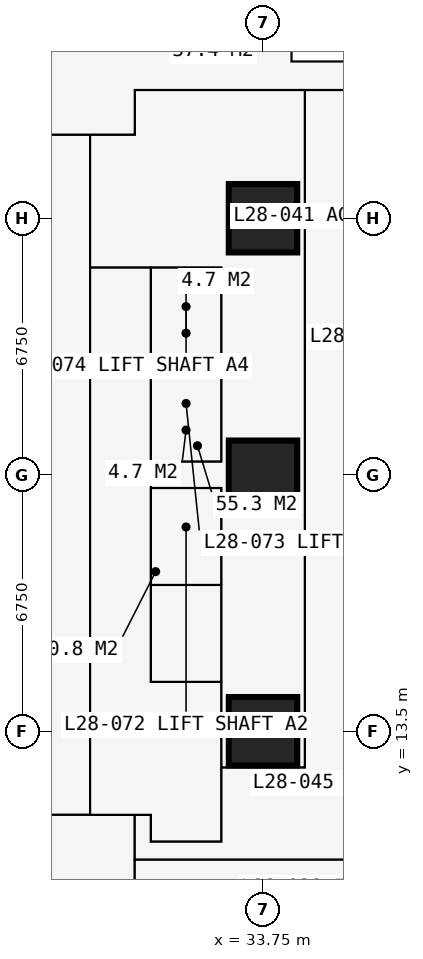
"""IFC4 building model, lengths in metres.
Left out: names, types, materials, properties, quantities, classifications, styles, units other than length and angle.
Written with IfcOpenShell. Run it as: python <this file> out.ifc"""

import sys

from ifc_helpers import new_model, si_unit, direction, frame, frame_2d, origin, origin_2d, place, context, subcontext, project, spatial, rectangle, extrude, element, fill, save


model = new_model("IFC4")
c1 = context("Model", 3, precision=1e-05, world=origin(), true_north=direction((0.0, 1.0)))
c2 = subcontext(c1, "Body", "Model", "MODEL_VIEW")
j1 = project(units=[si_unit("LENGTHUNIT", "METRE"), si_unit("PLANEANGLEUNIT", "RADIAN")], contexts=[c1])
p1 = place(None, origin())
s1 = spatial("IfcSite", under=j1, at=p1, CompositionType="ELEMENT")
p2 = place(p1, origin())
s2 = spatial("IfcBuilding", under=s1, at=p2, CompositionType="ELEMENT")
p3 = place(p2, frame((0.0, 0.0, 105.3)))
s3 = spatial("IfcBuildingStorey", under=s2, at=p3, CompositionType="ELEMENT", Elevation=105.3)
for number, where, z_axis, x_axis in (
    (1, (33.75, 13.5, 0.0), (0.0, 0.0, 1.0), (1.0, 0.0, 0.0)),
    (2, (33.75, 20.25, 0.0), (0.0, 0.0, 1.0), (1.0, 0.0, 0.0)),
    (3, (33.75, 27.0, 0.0), (0.0, 0.0, 1.0), (1.0, 0.0, 0.0)),
):
    element("IfcColumn", number, at=place(p3, frame(where, z_axis=z_axis, x_axis=x_axis)), inside=s3, PredefinedType="COLUMN", context=c2, shape_type="SweptSolid", body=[
        extrude(rectangle(XDim=1.8, YDim=1.8, at=origin_2d()), origin(), (0.0, 0.0, 1.0), 3.6),
    ])
p4 = place(p3, frame((37.875, 31.125, 0.0), z_axis=(0.0, 0.0, 1.0), x_axis=(-1.0, 0.0, 0.0)))
e4 = element("IfcWall", 4, at=p4, inside=s3, PredefinedType="SOLIDWALL", context=c2, shape_type="SweptSolid", body=[
    extrude(rectangle(XDim=3.375, YDim=0.3, at=frame_2d((1.688, 0.0))), origin(), (0.0, 0.0, 1.0), 3.375),
])
p5 = place(p4, frame((0.788, 0.0, 0.6)))
e5 = element("IfcOpeningElement", 5, at=p5, cuts=e4, PredefinedType="OPENING", context=c2, shape_type="SweptSolid", body=[
    extrude(rectangle(XDim=1.8, YDim=2.1, at=frame_2d((0.9, 1.05))), frame((0.0, 0.16, 0.0), z_axis=(0.0, -1.0, 0.0), x_axis=(1.0, 0.0, 0.0)), (0.0, 0.0, 1.0), 0.32),
])
p6 = place(p3, frame((34.5, 31.125, 0.0), z_axis=(0.0, 0.0, 1.0), x_axis=(0.0, 1.0, 0.0)))
e6 = element("IfcWall", 6, at=p6, inside=s3, PredefinedType="SOLIDWALL", context=c2, shape_type="SweptSolid", body=[
    extrude(rectangle(XDim=3.375, YDim=0.3, at=frame_2d((1.688, 0.0))), origin(), (0.0, 0.0, 1.0), 3.375),
])
p7 = place(p6, frame((0.343, 0.0, 0.9)))
e7 = element("IfcOpeningElement", 7, at=p7, cuts=e6, PredefinedType="OPENING", context=c2, shape_type="SweptSolid", body=[
    extrude(rectangle(XDim=1.2, YDim=1.8, at=frame_2d((0.6, 0.9))), frame((0.0, 0.16, 0.0), z_axis=(0.0, -1.0, 0.0), x_axis=(1.0, 0.0, 0.0)), (0.0, 0.0, 1.0), 0.32),
])
p8 = place(p3, frame((10.125, 11.3, 0.0), z_axis=(0.0, 0.0, 1.0), x_axis=(1.0, 0.0, 0.0)))
e8 = element("IfcWall", 8, at=p8, inside=s3, PredefinedType="PARTITIONING", context=c2, shape_type="SweptSolid", body=[
    extrude(rectangle(XDim=20.675, YDim=0.15, at=frame_2d((10.337, 0.0))), origin(), (0.0, 0.0, 1.0), 3.375),
])
p9 = place(p8, frame((1.775, 0.0, 0.0)))
e9 = element("IfcOpeningElement", 9, at=p9, cuts=e8, PredefinedType="OPENING", context=c2, shape_type="SweptSolid", body=[
    extrude(rectangle(XDim=1.0, YDim=2.2, at=frame_2d((0.5, 1.1))), frame((0.0, 0.085, 0.0), z_axis=(0.0, -1.0, 0.0), x_axis=(1.0, 0.0, 0.0)), (0.0, 0.0, 1.0), 0.17),
])
p10 = place(p8, frame((11.312, 0.0, 0.0)))
e10 = element("IfcOpeningElement", 10, at=p10, cuts=e8, PredefinedType="OPENING", context=c2, shape_type="SweptSolid", body=[
    extrude(rectangle(XDim=1.0, YDim=2.2, at=frame_2d((0.5, 1.1))), frame((0.0, 0.085, 0.0), z_axis=(0.0, -1.0, 0.0), x_axis=(1.0, 0.0, 0.0)), (0.0, 0.0, 1.0), 0.17),
])
p11 = place(p3, frame((11.3, 29.2, 0.0), z_axis=(0.0, 0.0, 1.0), x_axis=(1.0, 0.0, 0.0)))
e11 = element("IfcWall", 11, at=p11, inside=s3, PredefinedType="PARTITIONING", context=c2, shape_type="SweptSolid", body=[
    extrude(rectangle(XDim=19.075, YDim=0.1, at=frame_2d((9.538, 0.0))), origin(), (0.0, 0.0, 1.0), 3.375),
])
p12 = place(p11, frame((6.4, 0.0, 0.0)))
e12 = element("IfcOpeningElement", 12, at=p12, cuts=e11, PredefinedType="OPENING", context=c2, shape_type="SweptSolid", body=[
    extrude(rectangle(XDim=0.95, YDim=2.2, at=frame_2d((0.475, 1.1))), frame((0.0, 0.06, 0.0), z_axis=(0.0, -1.0, 0.0), x_axis=(1.0, 0.0, 0.0)), (0.0, 0.0, 1.0), 0.12),
])
p13 = place(p11, frame((13.15, 0.0, 0.0)))
e13 = element("IfcOpeningElement", 13, at=p13, cuts=e11, PredefinedType="OPENING", context=c2, shape_type="SweptSolid", body=[
    extrude(rectangle(XDim=0.95, YDim=2.2, at=frame_2d((0.475, 1.1))), frame((0.0, 0.06, 0.0), z_axis=(0.0, -1.0, 0.0), x_axis=(1.0, 0.0, 0.0)), (0.0, 0.0, 1.0), 0.12),
])
p14 = place(p11, frame((0.6, 0.0, 0.0)))
e14 = element("IfcOpeningElement", 14, at=p14, cuts=e11, PredefinedType="OPENING", context=c2, shape_type="SweptSolid", body=[
    extrude(rectangle(XDim=1.0, YDim=2.2, at=frame_2d((0.5, 1.1))), frame((0.0, 0.06, 0.0), z_axis=(0.0, -1.0, 0.0), x_axis=(1.0, 0.0, 0.0)), (0.0, 0.0, 1.0), 0.12),
])
p15 = place(p3, frame((29.2, 11.3, 0.0), z_axis=(0.0, 0.0, 1.0), x_axis=(0.0, 1.0, 0.0)))
e15 = element("IfcWall", 15, at=p15, inside=s3, PredefinedType="PARTITIONING", context=c2, shape_type="SweptSolid", body=[
    extrude(rectangle(XDim=17.9, YDim=0.2, at=frame_2d((8.95, 0.0))), origin(), (0.0, 0.0, 1.0), 3.375),
])
p16 = place(p15, frame((8.35, 0.0, 0.0)))
e16 = element("IfcOpeningElement", 16, at=p16, cuts=e15, PredefinedType="OPENING", context=c2, shape_type="SweptSolid", body=[
    extrude(rectangle(XDim=1.2, YDim=2.2, at=frame_2d((0.6, 1.1))), frame((0.0, 0.11, 0.0), z_axis=(0.0, -1.0, 0.0), x_axis=(1.0, 0.0, 0.0)), (0.0, 0.0, 1.0), 0.22),
])
p17 = place(p3, frame((29.2, 25.7, 0.0), z_axis=(0.0, 0.0, 1.0), x_axis=(1.0, 0.0, 0.0)))
e17 = element("IfcWall", 17, at=p17, inside=s3, PredefinedType="SHEAR", context=c2, shape_type="SweptSolid", body=[
    extrude(rectangle(XDim=3.45, YDim=0.1, at=frame_2d((1.725, 0.0))), origin(), (0.0, 0.0, 1.0), 3.375),
])
p18 = place(p3, frame((30.375, -0.734, 0.0), z_axis=(0.0, 0.0, 1.0), x_axis=(0.0, 1.0, 0.0)))
e18 = element("IfcWall", 18, at=p18, inside=s3, PredefinedType="PARTITIONING", context=c2, shape_type="SweptSolid", body=[
    extrude(rectangle(XDim=12.034, YDim=0.15, at=frame_2d((6.017, 0.0))), origin(), (0.0, 0.0, 1.0), 3.375),
])
p19 = place(p3, frame((30.375, 10.125, 0.0), z_axis=(0.0, 0.0, 1.0), x_axis=(1.0, 0.0, 0.0)))
e19 = element("IfcWall", 19, at=p19, inside=s3, PredefinedType="PARTITIONING", context=c2, shape_type="SweptSolid", body=[
    extrude(rectangle(XDim=10.859, YDim=0.15, at=frame_2d((5.429, 0.0))), origin(), (0.0, 0.0, 1.0), 3.375),
])
p20 = place(p19, frame((2.5, 0.0, 0.0)))
e20 = element("IfcOpeningElement", 20, at=p20, cuts=e19, PredefinedType="OPENING", context=c2, shape_type="SweptSolid", body=[
    extrude(rectangle(XDim=1.0, YDim=2.2, at=frame_2d((0.5, 1.1))), frame((0.0, 0.085, 0.0), z_axis=(0.0, -1.0, 0.0), x_axis=(1.0, 0.0, 0.0)), (0.0, 0.0, 1.0), 0.17),
])
p21 = place(p3, frame((30.375, 29.2, 0.0), z_axis=(0.0, 0.0, 1.0), x_axis=(0.0, 1.0, 0.0)))
e21 = element("IfcWall", 21, at=p21, inside=s3, PredefinedType="PARTITIONING", context=c2, shape_type="SweptSolid", body=[
    extrude(rectangle(XDim=1.175, YDim=0.15, at=frame_2d((0.587, 0.0))), origin(), (0.0, 0.0, 1.0), 3.375),
])
p22 = place(p3, frame((30.375, 30.375, 0.0), z_axis=(0.0, 0.0, 1.0), x_axis=(1.0, 0.0, 0.0)))
e22 = element("IfcWall", 22, at=p22, inside=s3, PredefinedType="PARTITIONING", context=c2, shape_type="SweptSolid", body=[
    extrude(rectangle(XDim=7.35, YDim=0.15, at=frame_2d((3.675, 0.0))), origin(), (0.0, 0.0, 1.0), 2.877),
])
p23 = place(p22, frame((5.125, 0.0, 0.0)))
e23 = element("IfcOpeningElement", 23, at=p23, cuts=e22, PredefinedType="OPENING", context=c2, shape_type="SweptSolid", body=[
    extrude(rectangle(XDim=1.0, YDim=2.2, at=frame_2d((0.5, 1.1))), frame((0.0, 0.085, 0.0), z_axis=(0.0, -1.0, 0.0), x_axis=(1.0, 0.0, 0.0)), (0.0, 0.0, 1.0), 0.17),
])
p24 = place(p3, frame((30.8, 10.6, 0.0), z_axis=(0.0, 0.0, 1.0), x_axis=(0.0, 1.0, 0.0)))
e24 = element("IfcWall", 24, at=p24, inside=s3, PredefinedType="PARTITIONING", context=c2, shape_type="SweptSolid", body=[
    extrude(rectangle(XDim=0.7, YDim=0.15, at=frame_2d((0.35, 0.0))), origin(), (0.0, 0.0, 1.0), 3.375),
])
p25 = place(p3, frame((30.8, 10.6, 0.0), z_axis=(0.0, 0.0, 1.0), x_axis=(1.0, 0.0, 0.0)))
e25 = element("IfcWall", 25, at=p25, inside=s3, PredefinedType="PARTITIONING", context=c2, shape_type="SweptSolid", body=[
    extrude(rectangle(XDim=1.85, YDim=0.15, at=frame_2d((0.925, 0.0))), origin(), (0.0, 0.0, 1.0), 3.375),
])
p26 = place(p3, frame((30.8, 14.8, 0.0), z_axis=(0.0, 0.0, 1.0), x_axis=(0.0, 1.0, 0.0)))
e26 = element("IfcWall", 26, at=p26, inside=s3, PredefinedType="PARTITIONING", context=c2, shape_type="SweptSolid", body=[
    extrude(rectangle(XDim=10.9, YDim=0.15, at=frame_2d((5.45, 0.0))), origin(), (0.0, 0.0, 1.0), 3.375),
])
p27 = place(p26, frame((0.75, 0.0, 0.0)))
e27 = element("IfcOpeningElement", 27, at=p27, cuts=e26, PredefinedType="OPENING", context=c2, shape_type="SweptSolid", body=[
    extrude(rectangle(XDim=1.1, YDim=2.2, at=frame_2d((0.55, 1.1))), frame((0.0, 0.085, 0.0), z_axis=(0.0, -1.0, 0.0), x_axis=(1.0, 0.0, 0.0)), (0.0, 0.0, 1.0), 0.17),
])
p28 = place(p26, frame((3.25, 0.0, 0.0)))
e28 = element("IfcOpeningElement", 28, at=p28, cuts=e26, PredefinedType="OPENING", context=c2, shape_type="SweptSolid", body=[
    extrude(rectangle(XDim=1.1, YDim=2.2, at=frame_2d((0.55, 1.1))), frame((0.0, 0.085, 0.0), z_axis=(0.0, -1.0, 0.0), x_axis=(1.0, 0.0, 0.0)), (0.0, 0.0, 1.0), 0.17),
])
p29 = place(p26, frame((6.5, 0.0, 0.0)))
e29 = element("IfcOpeningElement", 29, at=p29, cuts=e26, PredefinedType="OPENING", context=c2, shape_type="SweptSolid", body=[
    extrude(rectangle(XDim=1.1, YDim=2.2, at=frame_2d((0.55, 1.1))), frame((0.0, 0.085, 0.0), z_axis=(0.0, -1.0, 0.0), x_axis=(1.0, 0.0, 0.0)), (0.0, 0.0, 1.0), 0.17),
])
p30 = place(p26, frame((9.05, 0.0, 0.0)))
e30 = element("IfcOpeningElement", 30, at=p30, cuts=e26, PredefinedType="OPENING", context=c2, shape_type="SweptSolid", body=[
    extrude(rectangle(XDim=1.1, YDim=2.2, at=frame_2d((0.55, 1.1))), frame((0.0, 0.085, 0.0), z_axis=(0.0, -1.0, 0.0), x_axis=(1.0, 0.0, 0.0)), (0.0, 0.0, 1.0), 0.17),
])
for number, where, z_axis, x_axis in (
    (31, (30.8, 14.8, 0.0), (0.0, 0.0, 1.0), (1.0, 0.0, 0.0)),
    (32, (30.8, 17.35, 0.0), (0.0, 0.0, 1.0), (1.0, 0.0, 0.0)),
    (33, (30.8, 19.9, 0.0), (0.0, 0.0, 1.0), (1.0, 0.0, 0.0)),
    (34, (30.8, 20.6, 0.0), (0.0, 0.0, 1.0), (1.0, 0.0, 0.0)),
    (35, (30.8, 23.15, 0.0), (0.0, 0.0, 1.0), (1.0, 0.0, 0.0)),
):
    element("IfcWall", number, at=place(p3, frame(where, z_axis=z_axis, x_axis=x_axis)), inside=s3, PredefinedType="SHEAR", context=c2, shape_type="SweptSolid", body=[
        extrude(rectangle(XDim=1.85, YDim=0.1, at=frame_2d((0.925, 0.0))), origin(), (0.0, 0.0, 1.0), 3.375),
    ])
p31 = place(p3, frame((32.65, 10.6, 0.0), z_axis=(0.0, 0.0, 1.0), x_axis=(0.0, 1.0, 0.0)))
e36 = element("IfcWall", 36, at=p31, inside=s3, PredefinedType="SHEAR", context=c2, shape_type="SweptSolid", body=[
    extrude(rectangle(XDim=9.3, YDim=0.1, at=frame_2d((4.65, 0.0))), origin(), (0.0, 0.0, 1.0), 3.375),
])
p32 = place(p31, frame((0.5, 0.0, 0.0)))
e37 = element("IfcOpeningElement", 37, at=p32, cuts=e36, PredefinedType="OPENING", context=c2, shape_type="SweptSolid", body=[
    extrude(rectangle(XDim=1.0, YDim=2.2, at=frame_2d((0.5, 1.1))), frame((0.0, 0.06, 0.0), z_axis=(0.0, -1.0, 0.0), x_axis=(1.0, 0.0, 0.0)), (0.0, 0.0, 1.0), 0.12),
])
p33 = place(p3, frame((32.65, 12.55, 0.0), z_axis=(0.0, 0.0, 1.0), x_axis=(1.0, 0.0, 0.0)))
e38 = element("IfcWall", 38, at=p33, inside=s3, PredefinedType="PARTITIONING", context=c2, shape_type="SweptSolid", body=[
    extrude(rectangle(XDim=2.2, YDim=0.15, at=frame_2d((1.1, 0.0))), origin(), (0.0, 0.0, 1.0), 3.375),
])
p34 = place(p3, frame((32.65, 20.6, 0.0), z_axis=(0.0, 0.0, 1.0), x_axis=(0.0, 1.0, 0.0)))
e39 = element("IfcWall", 39, at=p34, inside=s3, PredefinedType="PARTITIONING", context=c2, shape_type="SweptSolid", body=[
    extrude(rectangle(XDim=5.1, YDim=0.15, at=frame_2d((2.55, 0.0))), origin(), (0.0, 0.0, 1.0), 3.375),
])
p35 = place(p3, frame((34.85, 12.55, 0.0), z_axis=(0.0, 0.0, 1.0), x_axis=(0.0, 1.0, 0.0)))
e40 = element("IfcWall", 40, at=p35, inside=s3, PredefinedType="PARTITIONING", context=c2, shape_type="SweptSolid", body=[
    extrude(rectangle(XDim=17.825, YDim=0.15, at=frame_2d((8.913, 0.0))), origin(), (0.0, 0.0, 1.0), 3.375),
])
p36 = place(p35, frame((8.6, 0.0, 0.0)))
e41 = element("IfcOpeningElement", 41, at=p36, cuts=e40, PredefinedType="OPENING", context=c2, shape_type="SweptSolid", body=[
    extrude(rectangle(XDim=0.95, YDim=2.2, at=frame_2d((0.475, 1.1))), frame((0.0, 0.085, 0.0), z_axis=(0.0, -1.0, 0.0), x_axis=(1.0, 0.0, 0.0)), (0.0, 0.0, 1.0), 0.17),
])
p37 = place(p5, origin())
e42 = element("IfcWindow", 42, at=p37, inside=s3, PartitioningType="SINGLE_PANEL", PredefinedType="WINDOW", context=c2, shape_type="SweptSolid", body=[
    extrude(rectangle(XDim=1.8, YDim=2.1, at=frame_2d((0.9, 1.05))), frame((0.0, 0.03, 0.0), z_axis=(0.0, -1.0, 0.0), x_axis=(1.0, 0.0, 0.0)), (0.0, 0.0, 1.0), 0.06),
])
fill(e5, e42)
p38 = place(p20, origin())
e43 = element("IfcDoor", 43, at=p38, inside=s3, OperationType="SINGLE_SWING_LEFT", PredefinedType="DOOR", context=c2, shape_type="SweptSolid", body=[
    extrude(rectangle(XDim=1.0, YDim=2.2, at=frame_2d((0.5, 1.1))), frame((0.0, 0.025, 0.0), z_axis=(0.0, -1.0, 0.0), x_axis=(1.0, 0.0, 0.0)), (0.0, 0.0, 1.0), 0.05),
])
fill(e20, e43)
p39 = place(p32, origin())
e44 = element("IfcDoor", 44, at=p39, inside=s3, OperationType="SINGLE_SWING_LEFT", PredefinedType="DOOR", context=c2, shape_type="SweptSolid", body=[
    extrude(rectangle(XDim=1.0, YDim=2.2, at=frame_2d((0.5, 1.1))), frame((0.0, 0.025, 0.0), z_axis=(0.0, -1.0, 0.0), x_axis=(1.0, 0.0, 0.0)), (0.0, 0.0, 1.0), 0.05),
])
fill(e37, e44)
p40 = place(p36, origin())
e45 = element("IfcDoor", 45, at=p40, inside=s3, OperationType="SINGLE_SWING_LEFT", PredefinedType="DOOR", context=c2, shape_type="SweptSolid", body=[
    extrude(rectangle(XDim=0.95, YDim=2.2, at=frame_2d((0.475, 1.1))), frame((0.0, 0.025, 0.0), z_axis=(0.0, -1.0, 0.0), x_axis=(1.0, 0.0, 0.0)), (0.0, 0.0, 1.0), 0.05),
])
fill(e41, e45)
p41 = place(p23, origin())
e46 = element("IfcDoor", 46, at=p41, inside=s3, OperationType="SINGLE_SWING_LEFT", PredefinedType="DOOR", context=c2, shape_type="SweptSolid", body=[
    extrude(rectangle(XDim=1.0, YDim=2.2, at=frame_2d((0.5, 1.1))), frame((0.0, 0.025, 0.0), z_axis=(0.0, -1.0, 0.0), x_axis=(1.0, 0.0, 0.0)), (0.0, 0.0, 1.0), 0.05),
])
fill(e23, e46)
p42 = place(p27, origin())
e47 = element("IfcDoor", 47, at=p42, inside=s3, OperationType="DOUBLE_DOOR_SLIDING", PredefinedType="DOOR", context=c2, shape_type="SweptSolid", body=[
    extrude(rectangle(XDim=1.1, YDim=2.2, at=frame_2d((0.55, 1.1))), frame((0.0, 0.025, 0.0), z_axis=(0.0, -1.0, 0.0), x_axis=(1.0, 0.0, 0.0)), (0.0, 0.0, 1.0), 0.05),
])
fill(e27, e47)
p43 = place(p28, origin())
e48 = element("IfcDoor", 48, at=p43, inside=s3, OperationType="DOUBLE_DOOR_SLIDING", PredefinedType="DOOR", context=c2, shape_type="SweptSolid", body=[
    extrude(rectangle(XDim=1.1, YDim=2.2, at=frame_2d((0.55, 1.1))), frame((0.0, 0.025, 0.0), z_axis=(0.0, -1.0, 0.0), x_axis=(1.0, 0.0, 0.0)), (0.0, 0.0, 1.0), 0.05),
])
fill(e28, e48)
p44 = place(p29, origin())
e49 = element("IfcDoor", 49, at=p44, inside=s3, OperationType="DOUBLE_DOOR_SLIDING", PredefinedType="DOOR", context=c2, shape_type="SweptSolid", body=[
    extrude(rectangle(XDim=1.1, YDim=2.2, at=frame_2d((0.55, 1.1))), frame((0.0, 0.025, 0.0), z_axis=(0.0, -1.0, 0.0), x_axis=(1.0, 0.0, 0.0)), (0.0, 0.0, 1.0), 0.05),
])
fill(e29, e49)
p45 = place(p30, origin())
e50 = element("IfcDoor", 50, at=p45, inside=s3, OperationType="DOUBLE_DOOR_SLIDING", PredefinedType="DOOR", context=c2, shape_type="SweptSolid", body=[
    extrude(rectangle(XDim=1.1, YDim=2.2, at=frame_2d((0.55, 1.1))), frame((0.0, 0.025, 0.0), z_axis=(0.0, -1.0, 0.0), x_axis=(1.0, 0.0, 0.0)), (0.0, 0.0, 1.0), 0.05),
])
fill(e30, e50)
p46 = place(p16, origin())
e51 = element("IfcDoor", 51, at=p46, inside=s3, OperationType="DOUBLE_DOOR_SINGLE_SWING", PredefinedType="DOOR", context=c2, shape_type="SweptSolid", body=[
    extrude(rectangle(XDim=1.2, YDim=2.2, at=frame_2d((0.6, 1.1))), frame((0.0, 0.025, 0.0), z_axis=(0.0, -1.0, 0.0), x_axis=(1.0, 0.0, 0.0)), (0.0, 0.0, 1.0), 0.05),
])
fill(e16, e51)
save(model, sys.argv[1])
